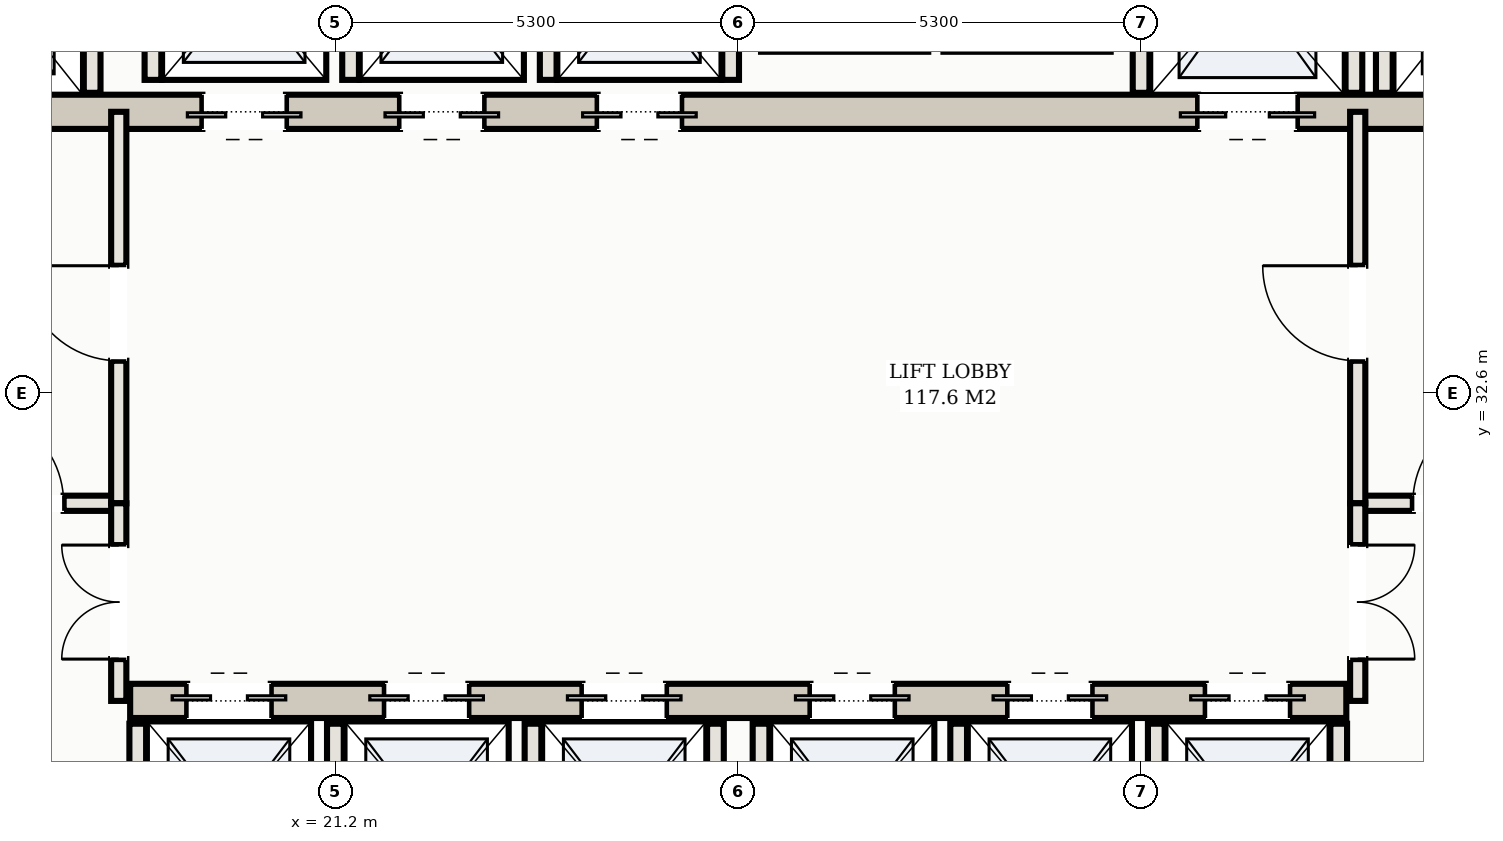
"""IFC4 building model, lengths in metres.
Left out: names, types, materials, properties, quantities, classifications, styles, units other than length and angle.
Written with IfcOpenShell. Run it as: python <this file> out.ifc"""

import sys

from ifc_helpers import new_model, si_unit, direction, frame, frame_2d, origin, place, context, subcontext, project, spatial, rectangle, extrude, element, fill, save


model = new_model("IFC4")
c1 = context("Model", 3, precision=1e-05, world=origin(), true_north=direction((0.0, 1.0)))
c2 = subcontext(c1, "Body", "Model", "MODEL_VIEW")
j1 = project(units=[si_unit("LENGTHUNIT", "METRE"), si_unit("PLANEANGLEUNIT", "RADIAN")], contexts=[c1])
p1 = place(None, origin())
s1 = spatial("IfcSite", under=j1, at=p1, CompositionType="ELEMENT")
p2 = place(p1, origin())
s2 = spatial("IfcBuilding", under=s1, at=p2, CompositionType="ELEMENT")
p3 = place(p2, frame((0.0, 0.0, 77.2)))
s3 = spatial("IfcBuildingStorey", under=s2, at=p3, CompositionType="ELEMENT", Elevation=77.2)
p4 = place(p3, frame((15.5, 36.3, 0.0), z_axis=(0.0, 0.0, 1.0), x_axis=(1.0, 0.0, 0.0)))
e1 = element("IfcWall", 1, at=p4, inside=s3, PredefinedType="SHEAR", context=c2, shape_type="SweptSolid", body=[
    extrude(rectangle(XDim=22.0, YDim=0.45, at=frame_2d((11.0, 0.0))), origin(), (0.0, 0.0, 1.0), 4.29),
])
p5 = place(p4, frame((0.65, 0.0, 0.0)))
e2 = element("IfcOpeningElement", 2, at=p5, cuts=e1, PredefinedType="OPENING", context=c2, shape_type="SweptSolid", body=[
    extrude(rectangle(XDim=1.1, YDim=2.15, at=frame_2d((0.55, 1.075))), frame((0.0, 0.235, 0.0), z_axis=(0.0, -1.0, 0.0), x_axis=(1.0, 0.0, 0.0)), (0.0, 0.0, 1.0), 0.47),
])
p6 = place(p4, frame((20.25, 0.0, 0.0)))
e3 = element("IfcOpeningElement", 3, at=p6, cuts=e1, PredefinedType="OPENING", context=c2, shape_type="SweptSolid", body=[
    extrude(rectangle(XDim=1.1, YDim=2.15, at=frame_2d((0.55, 1.075))), frame((0.0, 0.235, 0.0), z_axis=(0.0, -1.0, 0.0), x_axis=(1.0, 0.0, 0.0)), (0.0, 0.0, 1.0), 0.47),
])
p7 = place(p4, frame((17.05, 0.0, 0.0)))
e4 = element("IfcOpeningElement", 4, at=p7, cuts=e1, PredefinedType="OPENING", context=c2, shape_type="SweptSolid", body=[
    extrude(rectangle(XDim=1.3, YDim=2.2, at=frame_2d((0.65, 1.1))), frame((0.0, 0.235, 0.0), z_axis=(0.0, -1.0, 0.0), x_axis=(1.0, 0.0, 0.0)), (0.0, 0.0, 1.0), 0.47),
])
p8 = place(p4, frame((3.95, 0.0, 0.0)))
e5 = element("IfcOpeningElement", 5, at=p8, cuts=e1, PredefinedType="OPENING", context=c2, shape_type="SweptSolid", body=[
    extrude(rectangle(XDim=1.1, YDim=2.15, at=frame_2d((0.55, 1.075))), frame((0.0, 0.235, 0.0), z_axis=(0.0, -1.0, 0.0), x_axis=(1.0, 0.0, 0.0)), (0.0, 0.0, 1.0), 0.47),
])
p9 = place(p4, frame((6.55, 0.0, 0.0)))
e6 = element("IfcOpeningElement", 6, at=p9, cuts=e1, PredefinedType="OPENING", context=c2, shape_type="SweptSolid", body=[
    extrude(rectangle(XDim=1.1, YDim=2.15, at=frame_2d((0.55, 1.075))), frame((0.0, 0.235, 0.0), z_axis=(0.0, -1.0, 0.0), x_axis=(1.0, 0.0, 0.0)), (0.0, 0.0, 1.0), 0.47),
])
p10 = place(p4, frame((9.15, 0.0, 0.0)))
e7 = element("IfcOpeningElement", 7, at=p10, cuts=e1, PredefinedType="OPENING", context=c2, shape_type="SweptSolid", body=[
    extrude(rectangle(XDim=1.1, YDim=2.15, at=frame_2d((0.55, 1.075))), frame((0.0, 0.235, 0.0), z_axis=(0.0, -1.0, 0.0), x_axis=(1.0, 0.0, 0.0)), (0.0, 0.0, 1.0), 0.47),
])
p11 = place(p3, frame((18.5, 28.55, 0.0), z_axis=(0.0, 0.0, 1.0), x_axis=(1.0, 0.0, 0.0)))
e8 = element("IfcWall", 8, at=p11, inside=s3, PredefinedType="SHEAR", context=c2, shape_type="SweptSolid", body=[
    extrude(rectangle(XDim=16.0, YDim=0.45, at=frame_2d((8.0, 0.0))), origin(), (0.0, 0.0, 1.0), 4.29),
])
p12 = place(p11, frame((0.75, 0.0, 0.0)))
e9 = element("IfcOpeningElement", 9, at=p12, cuts=e8, PredefinedType="OPENING", context=c2, shape_type="SweptSolid", body=[
    extrude(rectangle(XDim=1.1, YDim=2.15, at=frame_2d((0.55, 1.075))), frame((0.0, 0.235, 0.0), z_axis=(0.0, -1.0, 0.0), x_axis=(1.0, 0.0, 0.0)), (0.0, 0.0, 1.0), 0.47),
])
p13 = place(p11, frame((3.35, 0.0, 0.0)))
e10 = element("IfcOpeningElement", 10, at=p13, cuts=e8, PredefinedType="OPENING", context=c2, shape_type="SweptSolid", body=[
    extrude(rectangle(XDim=1.1, YDim=2.15, at=frame_2d((0.55, 1.075))), frame((0.0, 0.235, 0.0), z_axis=(0.0, -1.0, 0.0), x_axis=(1.0, 0.0, 0.0)), (0.0, 0.0, 1.0), 0.47),
])
p14 = place(p11, frame((5.95, 0.0, 0.0)))
e11 = element("IfcOpeningElement", 11, at=p14, cuts=e8, PredefinedType="OPENING", context=c2, shape_type="SweptSolid", body=[
    extrude(rectangle(XDim=1.1, YDim=2.15, at=frame_2d((0.55, 1.075))), frame((0.0, 0.235, 0.0), z_axis=(0.0, -1.0, 0.0), x_axis=(1.0, 0.0, 0.0)), (0.0, 0.0, 1.0), 0.47),
])
p15 = place(p11, frame((8.95, 0.0, 0.0)))
e12 = element("IfcOpeningElement", 12, at=p15, cuts=e8, PredefinedType="OPENING", context=c2, shape_type="SweptSolid", body=[
    extrude(rectangle(XDim=1.1, YDim=2.15, at=frame_2d((0.55, 1.075))), frame((0.0, 0.235, 0.0), z_axis=(0.0, -1.0, 0.0), x_axis=(1.0, 0.0, 0.0)), (0.0, 0.0, 1.0), 0.47),
])
p16 = place(p11, frame((11.55, 0.0, 0.0)))
e13 = element("IfcOpeningElement", 13, at=p16, cuts=e8, PredefinedType="OPENING", context=c2, shape_type="SweptSolid", body=[
    extrude(rectangle(XDim=1.1, YDim=2.15, at=frame_2d((0.55, 1.075))), frame((0.0, 0.235, 0.0), z_axis=(0.0, -1.0, 0.0), x_axis=(1.0, 0.0, 0.0)), (0.0, 0.0, 1.0), 0.47),
])
p17 = place(p11, frame((14.15, 0.0, 0.0)))
e14 = element("IfcOpeningElement", 14, at=p17, cuts=e8, PredefinedType="OPENING", context=c2, shape_type="SweptSolid", body=[
    extrude(rectangle(XDim=1.1, YDim=2.15, at=frame_2d((0.55, 1.075))), frame((0.0, 0.235, 0.0), z_axis=(0.0, -1.0, 0.0), x_axis=(1.0, 0.0, 0.0)), (0.0, 0.0, 1.0), 0.47),
])
for number, where, z_axis, x_axis in (
    (15, (18.0, 36.55, 0.0), (0.0, 0.0, 1.0), (0.0, 1.0, 0.0)),
    (16, (35.0, 36.55, 0.0), (0.0, 0.0, 1.0), (0.0, 1.0, 0.0)),
    (17, (31.8, 36.55, 0.0), (0.0, 0.0, 1.0), (0.0, 1.0, 0.0)),
    (18, (34.6, 36.55, 0.0), (0.0, 0.0, 1.0), (0.0, 1.0, 0.0)),
):
    element("IfcWall", number, at=place(p3, frame(where, z_axis=z_axis, x_axis=x_axis)), inside=s3, PredefinedType="SOLIDWALL", context=c2, shape_type="SweptSolid", body=[
        extrude(rectangle(XDim=2.93, YDim=0.22, at=frame_2d((1.465, 0.0))), origin(), (0.0, 0.0, 1.0), 4.29),
    ])
for number, where, z_axis, x_axis in (
    (19, (18.6, 25.72, 0.0), (0.0, 0.0, 1.0), (0.0, 1.0, 0.0)),
    (20, (21.2, 25.72, 0.0), (0.0, 0.0, 1.0), (0.0, 1.0, 0.0)),
    (21, (23.8, 25.72, 0.0), (0.0, 0.0, 1.0), (0.0, 1.0, 0.0)),
    (22, (26.2, 25.72, 0.0), (0.0, 0.0, 1.0), (0.0, 1.0, 0.0)),
    (23, (26.8, 25.72, 0.0), (0.0, 0.0, 1.0), (0.0, 1.0, 0.0)),
    (24, (29.4, 25.72, 0.0), (0.0, 0.0, 1.0), (0.0, 1.0, 0.0)),
    (25, (32.0, 25.72, 0.0), (0.0, 0.0, 1.0), (0.0, 1.0, 0.0)),
    (26, (34.4, 25.72, 0.0), (0.0, 0.0, 1.0), (0.0, 1.0, 0.0)),
):
    element("IfcWall", number, at=place(p3, frame(where, z_axis=z_axis, x_axis=x_axis)), inside=s3, PredefinedType="SOLIDWALL", context=c2, shape_type="SweptSolid", body=[
        extrude(rectangle(XDim=2.53, YDim=0.22, at=frame_2d((1.265, 0.0))), origin(), (0.0, 0.0, 1.0), 4.29),
    ])
for number, where, z_axis, x_axis in (
    (27, (18.8, 36.72, 0.0), (0.0, 0.0, 1.0), (0.0, 1.0, 0.0)),
    (28, (21.4, 36.72, 0.0), (0.0, 0.0, 1.0), (0.0, 1.0, 0.0)),
    (29, (24.0, 36.72, 0.0), (0.0, 0.0, 1.0), (0.0, 1.0, 0.0)),
    (30, (26.4, 36.72, 0.0), (0.0, 0.0, 1.0), (0.0, 1.0, 0.0)),
):
    element("IfcWall", number, at=place(p3, frame(where, z_axis=z_axis, x_axis=x_axis)), inside=s3, PredefinedType="SOLIDWALL", context=c2, shape_type="SweptSolid", body=[
        extrude(rectangle(XDim=2.56, YDim=0.22, at=frame_2d((1.28, 0.0))), origin(), (0.0, 0.0, 1.0), 4.29),
    ])
p18 = place(p3, frame((15.1, 31.15, 0.0), z_axis=(0.0, 0.0, 1.0), x_axis=(1.0, 0.0, 0.0)))
e31 = element("IfcWall", 31, at=p18, inside=s3, PredefinedType="PARTITIONING", context=c2, shape_type="SweptSolid", body=[
    extrude(rectangle(XDim=3.25, YDim=0.2, at=frame_2d((1.625, 0.0))), origin(), (0.0, 0.0, 1.0), 4.29),
])
p19 = place(p18, frame((1.275, 0.0, 0.0)))
e32 = element("IfcOpeningElement", 32, at=p19, cuts=e31, PredefinedType="OPENING", context=c2, shape_type="SweptSolid", body=[
    extrude(rectangle(XDim=1.25, YDim=2.2, at=frame_2d((0.625, 1.1))), frame((0.0, 0.11, 0.0), z_axis=(0.0, -1.0, 0.0), x_axis=(1.0, 0.0, 0.0)), (0.0, 0.0, 1.0), 0.22),
])
p20 = place(p3, frame((18.35, 31.15, 0.0), z_axis=(0.0, 0.0, 1.0), x_axis=(0.0, 1.0, 0.0)))
e33 = element("IfcWall", 33, at=p20, inside=s3, PredefinedType="PARTITIONING", context=c2, shape_type="SweptSolid", body=[
    extrude(rectangle(XDim=5.15, YDim=0.2, at=frame_2d((2.575, 0.0))), origin(), (0.0, 0.0, 1.0), 4.29),
])
p21 = place(p20, frame((1.875, 0.0, 0.0)))
e34 = element("IfcOpeningElement", 34, at=p21, cuts=e33, PredefinedType="OPENING", context=c2, shape_type="SweptSolid", body=[
    extrude(rectangle(XDim=1.25, YDim=2.2, at=frame_2d((0.625, 1.1))), frame((0.0, 0.11, 0.0), z_axis=(0.0, -1.0, 0.0), x_axis=(1.0, 0.0, 0.0)), (0.0, 0.0, 1.0), 0.22),
])
p22 = place(p3, frame((34.65, 31.15, 0.0), z_axis=(0.0, 0.0, 1.0), x_axis=(1.0, 0.0, 0.0)))
e35 = element("IfcWall", 35, at=p22, inside=s3, PredefinedType="PARTITIONING", context=c2, shape_type="SweptSolid", body=[
    extrude(rectangle(XDim=3.25, YDim=0.2, at=frame_2d((1.625, 0.0))), origin(), (0.0, 0.0, 1.0), 4.29),
])
p23 = place(p22, frame((0.725, 0.0, 0.0)))
e36 = element("IfcOpeningElement", 36, at=p23, cuts=e35, PredefinedType="OPENING", context=c2, shape_type="SweptSolid", body=[
    extrude(rectangle(XDim=1.25, YDim=2.2, at=frame_2d((0.625, 1.1))), frame((0.0, 0.11, 0.0), z_axis=(0.0, -1.0, 0.0), x_axis=(1.0, 0.0, 0.0)), (0.0, 0.0, 1.0), 0.22),
])
p24 = place(p3, frame((34.65, 31.15, 0.0), z_axis=(0.0, 0.0, 1.0), x_axis=(0.0, 1.0, 0.0)))
e37 = element("IfcWall", 37, at=p24, inside=s3, PredefinedType="PARTITIONING", context=c2, shape_type="SweptSolid", body=[
    extrude(rectangle(XDim=5.15, YDim=0.2, at=frame_2d((2.575, 0.0))), origin(), (0.0, 0.0, 1.0), 4.29),
])
p25 = place(p24, frame((1.875, 0.0, 0.0)))
e38 = element("IfcOpeningElement", 38, at=p25, cuts=e37, PredefinedType="OPENING", context=c2, shape_type="SweptSolid", body=[
    extrude(rectangle(XDim=1.25, YDim=2.2, at=frame_2d((0.625, 1.1))), frame((0.0, 0.11, 0.0), z_axis=(0.0, -1.0, 0.0), x_axis=(1.0, 0.0, 0.0)), (0.0, 0.0, 1.0), 0.22),
])
p26 = place(p3, frame((18.35, 28.55, 0.0), z_axis=(0.0, 0.0, 1.0), x_axis=(0.0, 1.0, 0.0)))
e39 = element("IfcWall", 39, at=p26, inside=s3, PredefinedType="PARTITIONING", context=c2, shape_type="SweptSolid", body=[
    extrude(rectangle(XDim=2.6, YDim=0.2, at=frame_2d((1.3, 0.0))), origin(), (0.0, 0.0, 1.0), 4.29),
])
p27 = place(p26, frame((0.55, 0.0, 0.0)))
e40 = element("IfcOpeningElement", 40, at=p27, cuts=e39, PredefinedType="OPENING", context=c2, shape_type="SweptSolid", body=[
    extrude(rectangle(XDim=1.5, YDim=2.25, at=frame_2d((0.75, 1.125))), frame((0.0, 0.11, 0.0), z_axis=(0.0, -1.0, 0.0), x_axis=(1.0, 0.0, 0.0)), (0.0, 0.0, 1.0), 0.22),
])
p28 = place(p3, frame((34.65, 28.55, 0.0), z_axis=(0.0, 0.0, 1.0), x_axis=(0.0, 1.0, 0.0)))
e41 = element("IfcWall", 41, at=p28, inside=s3, PredefinedType="PARTITIONING", context=c2, shape_type="SweptSolid", body=[
    extrude(rectangle(XDim=2.6, YDim=0.2, at=frame_2d((1.3, 0.0))), origin(), (0.0, 0.0, 1.0), 4.29),
])
p29 = place(p28, frame((0.55, 0.0, 0.0)))
e42 = element("IfcOpeningElement", 42, at=p29, cuts=e41, PredefinedType="OPENING", context=c2, shape_type="SweptSolid", body=[
    extrude(rectangle(XDim=1.5, YDim=2.25, at=frame_2d((0.75, 1.125))), frame((0.0, 0.11, 0.0), z_axis=(0.0, -1.0, 0.0), x_axis=(1.0, 0.0, 0.0)), (0.0, 0.0, 1.0), 0.22),
])
p30 = place(p7, frame((1.3, 0.0, 0.0), z_axis=(0.0, 0.0, 1.0), x_axis=(-1.0, 0.0, 0.0)))
e43 = element("IfcDoor", 43, at=p30, inside=s3, OperationType="DOUBLE_DOOR_SLIDING", PredefinedType="DOOR", context=c2, shape_type="SweptSolid", body=[
    extrude(rectangle(XDim=1.3, YDim=2.2, at=frame_2d((0.65, 1.1))), frame((0.0, 0.025, 0.0), z_axis=(0.0, -1.0, 0.0), x_axis=(1.0, 0.0, 0.0)), (0.0, 0.0, 1.0), 0.05),
])
fill(e4, e43)
p31 = place(p12, origin())
e44 = element("IfcDoor", 44, at=p31, inside=s3, OperationType="DOUBLE_DOOR_SLIDING", PredefinedType="DOOR", context=c2, shape_type="SweptSolid", body=[
    extrude(rectangle(XDim=1.1, YDim=2.15, at=frame_2d((0.55, 1.075))), frame((0.0, 0.025, 0.0), z_axis=(0.0, -1.0, 0.0), x_axis=(1.0, 0.0, 0.0)), (0.0, 0.0, 1.0), 0.05),
])
fill(e9, e44)
p32 = place(p13, origin())
e45 = element("IfcDoor", 45, at=p32, inside=s3, OperationType="DOUBLE_DOOR_SLIDING", PredefinedType="DOOR", context=c2, shape_type="SweptSolid", body=[
    extrude(rectangle(XDim=1.1, YDim=2.15, at=frame_2d((0.55, 1.075))), frame((0.0, 0.025, 0.0), z_axis=(0.0, -1.0, 0.0), x_axis=(1.0, 0.0, 0.0)), (0.0, 0.0, 1.0), 0.05),
])
fill(e10, e45)
p33 = place(p14, origin())
e46 = element("IfcDoor", 46, at=p33, inside=s3, OperationType="DOUBLE_DOOR_SLIDING", PredefinedType="DOOR", context=c2, shape_type="SweptSolid", body=[
    extrude(rectangle(XDim=1.1, YDim=2.15, at=frame_2d((0.55, 1.075))), frame((0.0, 0.025, 0.0), z_axis=(0.0, -1.0, 0.0), x_axis=(1.0, 0.0, 0.0)), (0.0, 0.0, 1.0), 0.05),
])
fill(e11, e46)
p34 = place(p15, origin())
e47 = element("IfcDoor", 47, at=p34, inside=s3, OperationType="DOUBLE_DOOR_SLIDING", PredefinedType="DOOR", context=c2, shape_type="SweptSolid", body=[
    extrude(rectangle(XDim=1.1, YDim=2.15, at=frame_2d((0.55, 1.075))), frame((0.0, 0.025, 0.0), z_axis=(0.0, -1.0, 0.0), x_axis=(1.0, 0.0, 0.0)), (0.0, 0.0, 1.0), 0.05),
])
fill(e12, e47)
p35 = place(p16, origin())
e48 = element("IfcDoor", 48, at=p35, inside=s3, OperationType="DOUBLE_DOOR_SLIDING", PredefinedType="DOOR", context=c2, shape_type="SweptSolid", body=[
    extrude(rectangle(XDim=1.1, YDim=2.15, at=frame_2d((0.55, 1.075))), frame((0.0, 0.025, 0.0), z_axis=(0.0, -1.0, 0.0), x_axis=(1.0, 0.0, 0.0)), (0.0, 0.0, 1.0), 0.05),
])
fill(e13, e48)
p36 = place(p17, origin())
e49 = element("IfcDoor", 49, at=p36, inside=s3, OperationType="DOUBLE_DOOR_SLIDING", PredefinedType="DOOR", context=c2, shape_type="SweptSolid", body=[
    extrude(rectangle(XDim=1.1, YDim=2.15, at=frame_2d((0.55, 1.075))), frame((0.0, 0.025, 0.0), z_axis=(0.0, -1.0, 0.0), x_axis=(1.0, 0.0, 0.0)), (0.0, 0.0, 1.0), 0.05),
])
fill(e14, e49)
p37 = place(p8, frame((1.1, 0.0, 0.0), z_axis=(0.0, 0.0, 1.0), x_axis=(-1.0, 0.0, 0.0)))
e50 = element("IfcDoor", 50, at=p37, inside=s3, OperationType="DOUBLE_DOOR_SLIDING", PredefinedType="DOOR", context=c2, shape_type="SweptSolid", body=[
    extrude(rectangle(XDim=1.1, YDim=2.15, at=frame_2d((0.55, 1.075))), frame((0.0, 0.025, 0.0), z_axis=(0.0, -1.0, 0.0), x_axis=(1.0, 0.0, 0.0)), (0.0, 0.0, 1.0), 0.05),
])
fill(e5, e50)
p38 = place(p9, frame((1.1, 0.0, 0.0), z_axis=(0.0, 0.0, 1.0), x_axis=(-1.0, 0.0, 0.0)))
e51 = element("IfcDoor", 51, at=p38, inside=s3, OperationType="DOUBLE_DOOR_SLIDING", PredefinedType="DOOR", context=c2, shape_type="SweptSolid", body=[
    extrude(rectangle(XDim=1.1, YDim=2.15, at=frame_2d((0.55, 1.075))), frame((0.0, 0.025, 0.0), z_axis=(0.0, -1.0, 0.0), x_axis=(1.0, 0.0, 0.0)), (0.0, 0.0, 1.0), 0.05),
])
fill(e6, e51)
p39 = place(p10, frame((1.1, 0.0, 0.0), z_axis=(0.0, 0.0, 1.0), x_axis=(-1.0, 0.0, 0.0)))
e52 = element("IfcDoor", 52, at=p39, inside=s3, OperationType="DOUBLE_DOOR_SLIDING", PredefinedType="DOOR", context=c2, shape_type="SweptSolid", body=[
    extrude(rectangle(XDim=1.1, YDim=2.15, at=frame_2d((0.55, 1.075))), frame((0.0, 0.025, 0.0), z_axis=(0.0, -1.0, 0.0), x_axis=(1.0, 0.0, 0.0)), (0.0, 0.0, 1.0), 0.05),
])
fill(e7, e52)
p40 = place(p19, origin())
e53 = element("IfcDoor", 53, at=p40, inside=s3, OperationType="SINGLE_SWING_LEFT", PredefinedType="DOOR", context=c2, shape_type="SweptSolid", body=[
    extrude(rectangle(XDim=1.25, YDim=2.2, at=frame_2d((0.625, 1.1))), frame((0.0, 0.025, 0.0), z_axis=(0.0, -1.0, 0.0), x_axis=(1.0, 0.0, 0.0)), (0.0, 0.0, 1.0), 0.05),
])
fill(e32, e53)
p41 = place(p21, origin())
e54 = element("IfcDoor", 54, at=p41, inside=s3, OperationType="SINGLE_SWING_RIGHT", PredefinedType="DOOR", context=c2, shape_type="SweptSolid", body=[
    extrude(rectangle(XDim=1.25, YDim=2.2, at=frame_2d((0.625, 1.1))), frame((0.0, 0.025, 0.0), z_axis=(0.0, -1.0, 0.0), x_axis=(1.0, 0.0, 0.0)), (0.0, 0.0, 1.0), 0.05),
])
fill(e34, e54)
p42 = place(p23, origin())
e55 = element("IfcDoor", 55, at=p42, inside=s3, OperationType="SINGLE_SWING_RIGHT", PredefinedType="DOOR", context=c2, shape_type="SweptSolid", body=[
    extrude(rectangle(XDim=1.25, YDim=2.2, at=frame_2d((0.625, 1.1))), frame((0.0, 0.025, 0.0), z_axis=(0.0, -1.0, 0.0), x_axis=(1.0, 0.0, 0.0)), (0.0, 0.0, 1.0), 0.05),
])
fill(e36, e55)
p43 = place(p25, origin())
e56 = element("IfcDoor", 56, at=p43, inside=s3, OperationType="SINGLE_SWING_RIGHT", PredefinedType="DOOR", context=c2, shape_type="SweptSolid", body=[
    extrude(rectangle(XDim=1.25, YDim=2.2, at=frame_2d((0.625, 1.1))), frame((0.0, 0.025, 0.0), z_axis=(0.0, -1.0, 0.0), x_axis=(1.0, 0.0, 0.0)), (0.0, 0.0, 1.0), 0.05),
])
fill(e38, e56)
p44 = place(p27, origin())
e57 = element("IfcDoor", 57, at=p44, inside=s3, OperationType="DOUBLE_DOOR_SINGLE_SWING", PredefinedType="DOOR", context=c2, shape_type="SweptSolid", body=[
    extrude(rectangle(XDim=1.5, YDim=2.25, at=frame_2d((0.75, 1.125))), frame((0.0, 0.025, 0.0), z_axis=(0.0, -1.0, 0.0), x_axis=(1.0, 0.0, 0.0)), (0.0, 0.0, 1.0), 0.05),
])
fill(e40, e57)
p45 = place(p29, frame((1.5, 0.0, 0.0), z_axis=(0.0, 0.0, 1.0), x_axis=(-1.0, 0.0, 0.0)))
e58 = element("IfcDoor", 58, at=p45, inside=s3, OperationType="DOUBLE_DOOR_SINGLE_SWING", PredefinedType="DOOR", context=c2, shape_type="SweptSolid", body=[
    extrude(rectangle(XDim=1.5, YDim=2.25, at=frame_2d((0.75, 1.125))), frame((0.0, 0.025, 0.0), z_axis=(0.0, -1.0, 0.0), x_axis=(1.0, 0.0, 0.0)), (0.0, 0.0, 1.0), 0.05),
])
fill(e42, e58)
save(model, sys.argv[1])
